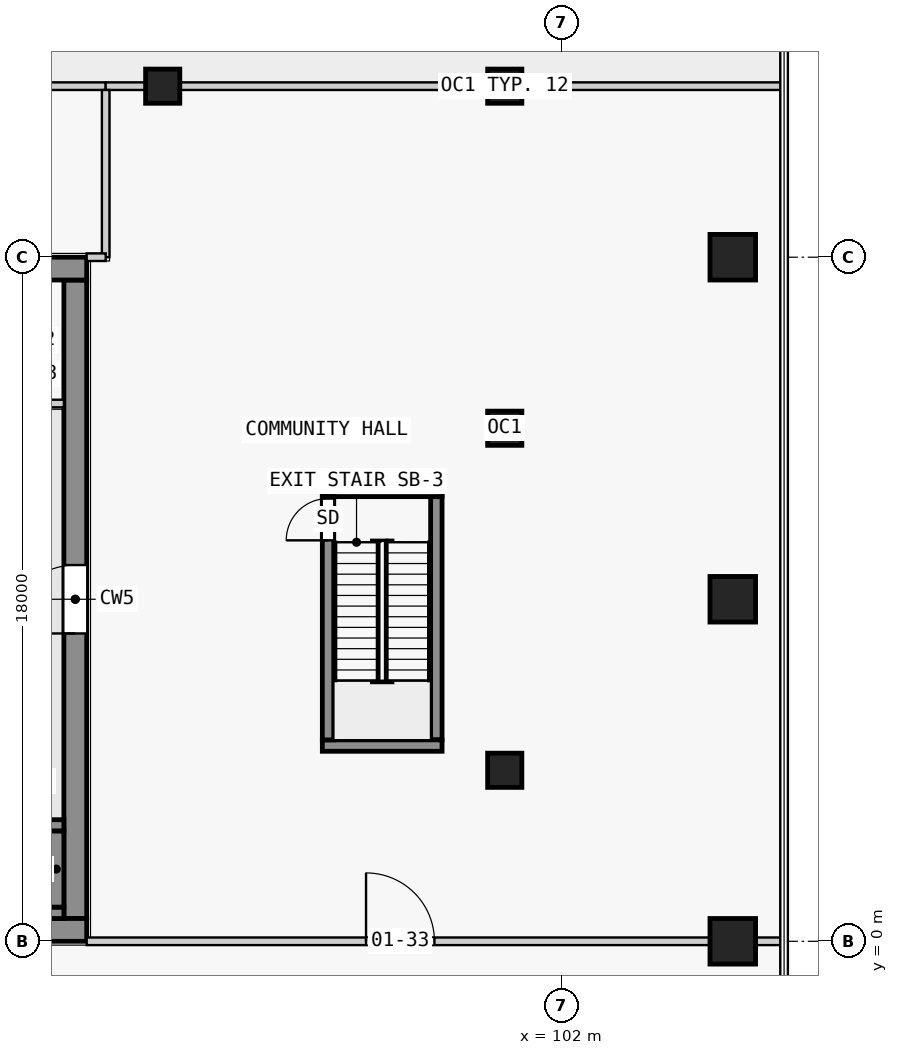
"""IFC4 building model, lengths in metres.
Left out: names, types, materials, properties, quantities, classifications, styles, units other than length and angle.
Written with IfcOpenShell. Run it as: python <this file> out.ifc"""

import sys

from ifc_helpers import new_model, si_unit, direction, frame, frame_2d, origin, origin_2d, place, context, subcontext, project, spatial, rectangle, extrude, element, fill, save


model = new_model("IFC4")
c1 = context("Model", 3, precision=1e-05, world=origin(), true_north=direction((0.0, 1.0)))
c2 = subcontext(c1, "Body", "Model", "MODEL_VIEW")
j1 = project(units=[si_unit("LENGTHUNIT", "METRE"), si_unit("PLANEANGLEUNIT", "RADIAN")], contexts=[c1])
p1 = place(None, origin())
s1 = spatial("IfcSite", under=j1, at=p1, CompositionType="ELEMENT")
p2 = place(p1, origin())
s2 = spatial("IfcBuilding", under=s1, at=p2, CompositionType="ELEMENT")
p3 = place(p2, frame((0.0, 0.0, 8.0)))
s3 = spatial("IfcBuildingStorey", under=s2, at=p3, CompositionType="ELEMENT", Elevation=8.0)
for number, where, z_axis, x_axis in (
    (1, (106.5, 0.0, 0.0), (0.0, 0.0, 1.0), (1.0, 0.0, 0.0)),
    (2, (106.5, 9.0, 0.0), (0.0, 0.0, 1.0), (1.0, 0.0, 0.0)),
    (3, (106.5, 18.0, 0.0), (0.0, 0.0, 1.0), (1.0, 0.0, 0.0)),
):
    element("IfcColumn", number, at=place(p3, frame(where, z_axis=z_axis, x_axis=x_axis)), inside=s3, PredefinedType="COLUMN", context=c2, shape_type="SweptSolid", body=[
        extrude(rectangle(XDim=1.2, YDim=1.2, at=origin_2d()), origin(), (0.0, 0.0, 1.0), 4.8),
    ])
for number, where, z_axis, x_axis in (
    (4, (100.5, 4.5, 0.0), (0.0, 0.0, 1.0), (1.0, 0.0, 0.0)),
    (5, (100.5, 13.5, 0.0), (0.0, 0.0, 1.0), (1.0, 0.0, 0.0)),
    (6, (100.5, 22.5, 0.0), (0.0, 0.0, 1.0), (1.0, 0.0, 0.0)),
    (7, (91.5, 22.5, 0.0), (0.0, 0.0, 1.0), (1.0, 0.0, 0.0)),
):
    element("IfcColumn", number, at=place(p3, frame(where, z_axis=z_axis, x_axis=x_axis)), inside=s3, PredefinedType="COLUMN", context=c2, shape_type="SweptSolid", body=[
        extrude(rectangle(XDim=0.9, YDim=0.9, at=origin_2d()), origin(), (0.0, 0.0, 1.0), 4.8),
    ])
for number, where, z_axis, x_axis in (
    (8, (75.0, 0.3, 0.0), (0.0, 0.0, 1.0), (1.0, 0.0, 0.0)),
    (9, (75.0, 17.7, 0.0), (0.0, 0.0, 1.0), (1.0, 0.0, 0.0)),
):
    element("IfcWall", number, at=place(p3, frame(where, z_axis=z_axis, x_axis=x_axis)), inside=s3, PredefinedType="SHEAR", context=c2, shape_type="SweptSolid", body=[
        extrude(rectangle(XDim=14.5, YDim=0.6, at=frame_2d((7.25, 0.0))), origin(), (0.0, 0.0, 1.0), 4.45),
    ])
p4 = place(p3, frame((89.2, 0.6, 0.0), z_axis=(0.0, 0.0, 1.0), x_axis=(0.0, 1.0, 0.0)))
e10 = element("IfcWall", 10, at=p4, inside=s3, PredefinedType="SHEAR", context=c2, shape_type="SweptSolid", body=[
    extrude(rectangle(XDim=16.8, YDim=0.6, at=frame_2d((8.4, 0.0))), origin(), (0.0, 0.0, 1.0), 4.45),
])
p5 = place(p4, frame((7.5, 0.0, 0.0)))
e11 = element("IfcOpeningElement", 11, at=p5, cuts=e10, PredefinedType="OPENING", context=c2, shape_type="SweptSolid", body=[
    extrude(rectangle(XDim=1.8, YDim=2.1, at=frame_2d((0.9, 1.05))), frame((0.0, 0.31, 0.0), z_axis=(0.0, -1.0, 0.0), x_axis=(1.0, 0.0, 0.0)), (0.0, 0.0, 1.0), 0.62),
])
p6 = place(p3, frame((81.3, 0.75, 0.0), z_axis=(0.0, 0.0, 1.0), x_axis=(1.0, 0.0, 0.0)))
e12 = element("IfcWall", 12, at=p6, inside=s3, PredefinedType="SHEAR", context=c2, shape_type="SweptSolid", body=[
    extrude(rectangle(XDim=7.6, YDim=0.3, at=frame_2d((3.8, 0.0))), origin(), (0.0, 0.0, 1.0), 4.45),
])
p7 = place(p3, frame((88.7, 0.9, 0.0), z_axis=(0.0, 0.0, 1.0), x_axis=(0.0, 1.0, 0.0)))
e13 = element("IfcWall", 13, at=p7, inside=s3, PredefinedType="SHEAR", context=c2, shape_type="SweptSolid", body=[
    extrude(rectangle(XDim=2.0, YDim=0.4, at=frame_2d((1.0, 0.0))), origin(), (0.0, 0.0, 1.0), 4.45),
])
p8 = place(p3, frame((81.3, 3.05, 0.0), z_axis=(0.0, 0.0, 1.0), x_axis=(1.0, 0.0, 0.0)))
e14 = element("IfcWall", 14, at=p8, inside=s3, PredefinedType="SHEAR", context=c2, shape_type="SweptSolid", body=[
    extrude(rectangle(XDim=7.6, YDim=0.3, at=frame_2d((3.8, 0.0))), origin(), (0.0, 0.0, 1.0), 4.45),
])
p9 = place(p8, frame((0.55, 0.0, 0.0)))
e15 = element("IfcOpeningElement", 15, at=p9, cuts=e14, PredefinedType="OPENING", context=c2, shape_type="SweptSolid", body=[
    extrude(rectangle(XDim=1.1, YDim=2.1, at=frame_2d((0.55, 1.05))), frame((0.0, 0.16, 0.0), z_axis=(0.0, -1.0, 0.0), x_axis=(1.0, 0.0, 0.0)), (0.0, 0.0, 1.0), 0.32),
])
p10 = place(p8, frame((3.05, 0.0, 0.0)))
e16 = element("IfcOpeningElement", 16, at=p10, cuts=e14, PredefinedType="OPENING", context=c2, shape_type="SweptSolid", body=[
    extrude(rectangle(XDim=1.1, YDim=2.1, at=frame_2d((0.55, 1.05))), frame((0.0, 0.16, 0.0), z_axis=(0.0, -1.0, 0.0), x_axis=(1.0, 0.0, 0.0)), (0.0, 0.0, 1.0), 0.32),
])
p11 = place(p8, frame((5.55, 0.0, 0.0)))
e17 = element("IfcOpeningElement", 17, at=p11, cuts=e14, PredefinedType="OPENING", context=c2, shape_type="SweptSolid", body=[
    extrude(rectangle(XDim=1.1, YDim=2.1, at=frame_2d((0.55, 1.05))), frame((0.0, 0.16, 0.0), z_axis=(0.0, -1.0, 0.0), x_axis=(1.0, 0.0, 0.0)), (0.0, 0.0, 1.0), 0.32),
])
p12 = place(p3, frame((95.85, 5.3, 0.0), z_axis=(0.0, 0.0, 1.0), x_axis=(0.0, 1.0, 0.0)))
e18 = element("IfcWall", 18, at=p12, inside=s3, PredefinedType="SHEAR", context=c2, shape_type="SweptSolid", body=[
    extrude(rectangle(XDim=6.4, YDim=0.3, at=frame_2d((3.2, 0.0))), origin(), (0.0, 0.0, 1.0), 4.45),
])
p13 = place(p12, frame((5.25, 0.0, 0.0)))
e19 = element("IfcOpeningElement", 19, at=p13, cuts=e18, PredefinedType="OPENING", context=c2, shape_type="SweptSolid", body=[
    extrude(rectangle(XDim=1.1, YDim=2.1, at=frame_2d((0.55, 1.05))), frame((0.0, 0.16, 0.0), z_axis=(0.0, -1.0, 0.0), x_axis=(1.0, 0.0, 0.0)), (0.0, 0.0, 1.0), 0.32),
])
p14 = place(p3, frame((98.7, 5.3, 0.0), z_axis=(0.0, 0.0, 1.0), x_axis=(0.0, 1.0, 0.0)))
e20 = element("IfcWall", 20, at=p14, inside=s3, PredefinedType="SHEAR", context=c2, shape_type="SweptSolid", body=[
    extrude(rectangle(XDim=6.4, YDim=0.3, at=frame_2d((3.2, 0.0))), origin(), (0.0, 0.0, 1.0), 4.45),
])
for number, where, z_axis, x_axis in (
    (21, (95.7, 5.15, 0.0), (0.0, 0.0, 1.0), (1.0, 0.0, 0.0)),
    (22, (95.7, 11.85, 0.0), (0.0, 0.0, 1.0), (1.0, 0.0, 0.0)),
):
    element("IfcWall", number, at=place(p3, frame(where, z_axis=z_axis, x_axis=x_axis)), inside=s3, PredefinedType="SHEAR", context=c2, shape_type="SweptSolid", body=[
        extrude(rectangle(XDim=3.15, YDim=0.3, at=frame_2d((1.575, 0.0))), origin(), (0.0, 0.0, 1.0), 4.45),
    ])
p15 = place(p3, frame((85.5, 14.15, 0.0), z_axis=(0.0, 0.0, 1.0), x_axis=(1.0, 0.0, 0.0)))
e23 = element("IfcWall", 23, at=p15, inside=s3, PredefinedType="PARTITIONING", context=c2, shape_type="SweptSolid", body=[
    extrude(rectangle(XDim=3.4, YDim=0.2, at=frame_2d((1.7, 0.0))), origin(), (0.0, 0.0, 1.0), 4.45),
])
p16 = place(p15, frame((0.4, 0.0, 0.0)))
e24 = element("IfcOpeningElement", 24, at=p16, cuts=e23, PredefinedType="OPENING", context=c2, shape_type="SweptSolid", body=[
    extrude(rectangle(XDim=0.9, YDim=2.1, at=frame_2d((0.45, 1.05))), frame((0.0, 0.11, 0.0), z_axis=(0.0, -1.0, 0.0), x_axis=(1.0, 0.0, 0.0)), (0.0, 0.0, 1.0), 0.22),
])
p17 = place(p15, frame((1.95, 0.0, 0.0)))
e25 = element("IfcOpeningElement", 25, at=p17, cuts=e23, PredefinedType="OPENING", context=c2, shape_type="SweptSolid", body=[
    extrude(rectangle(XDim=0.9, YDim=2.1, at=frame_2d((0.45, 1.05))), frame((0.0, 0.11, 0.0), z_axis=(0.0, -1.0, 0.0), x_axis=(1.0, 0.0, 0.0)), (0.0, 0.0, 1.0), 0.22),
])
p18 = place(p3, frame((89.5, 0.0, 0.0), z_axis=(0.0, 0.0, 1.0), x_axis=(1.0, 0.0, 0.0)))
e26 = element("IfcWall", 26, at=p18, inside=s3, PredefinedType="PARTITIONING", context=c2, shape_type="SweptSolid", body=[
    extrude(rectangle(XDim=16.4, YDim=0.2, at=frame_2d((8.2, 0.0))), origin(), (0.0, 0.0, 1.0), 4.45),
])
p19 = place(p18, frame((7.35, 0.0, 0.0)))
e27 = element("IfcOpeningElement", 27, at=p19, cuts=e26, PredefinedType="OPENING", context=c2, shape_type="SweptSolid", body=[
    extrude(rectangle(XDim=1.8, YDim=2.1, at=frame_2d((0.9, 1.05))), frame((0.0, 0.11, 0.0), z_axis=(0.0, -1.0, 0.0), x_axis=(1.0, 0.0, 0.0)), (0.0, 0.0, 1.0), 0.22),
])
p20 = place(p3, frame((107.1, 0.0, 0.0), z_axis=(0.0, 0.0, 1.0), x_axis=(1.0, 0.0, 0.0)))
e28 = element("IfcWall", 28, at=p20, inside=s3, PredefinedType="PARTITIONING", context=c2, shape_type="SweptSolid", body=[
    extrude(rectangle(XDim=0.75, YDim=0.2, at=frame_2d((0.375, 0.0))), origin(), (0.0, 0.0, 1.0), 4.45),
])
p21 = place(p3, frame((90.0, 22.5, 0.0), z_axis=(0.0, 0.0, 1.0), x_axis=(-1.0, 0.0, 0.0)))
e29 = element("IfcWall", 29, at=p21, inside=s3, PredefinedType="PARTITIONING", context=c2, shape_type="SweptSolid", body=[
    extrude(rectangle(XDim=7.05, YDim=0.2, at=frame_2d((3.525, 0.0))), origin(), (0.0, 0.0, 1.0), 4.45),
])
p22 = place(p21, frame((2.6, 0.0, 0.0)))
e30 = element("IfcOpeningElement", 30, at=p22, cuts=e29, PredefinedType="OPENING", context=c2, shape_type="SweptSolid", body=[
    extrude(rectangle(XDim=1.8, YDim=2.1, at=frame_2d((0.9, 1.05))), frame((0.0, 0.11, 0.0), z_axis=(0.0, -1.0, 0.0), x_axis=(1.0, 0.0, 0.0)), (0.0, 0.0, 1.0), 0.22),
])
p23 = place(p3, frame((107.85, 22.5, 0.0), z_axis=(0.0, 0.0, 1.0), x_axis=(-1.0, 0.0, 0.0)))
e31 = element("IfcWall", 31, at=p23, inside=s3, PredefinedType="PARTITIONING", context=c2, shape_type="SweptSolid", body=[
    extrude(rectangle(XDim=6.9, YDim=0.2, at=frame_2d((3.45, 0.0))), origin(), (0.0, 0.0, 1.0), 3.75),
])
p24 = place(p3, frame((100.05, 22.5, 0.0), z_axis=(0.0, 0.0, 1.0), x_axis=(-1.0, 0.0, 0.0)))
e32 = element("IfcWall", 32, at=p24, inside=s3, PredefinedType="PARTITIONING", context=c2, shape_type="SweptSolid", body=[
    extrude(rectangle(XDim=8.1, YDim=0.2, at=frame_2d((4.05, 0.0))), origin(), (0.0, 0.0, 1.0), 4.45),
])
p25 = place(p3, frame((91.05, 22.5, 0.0), z_axis=(0.0, 0.0, 1.0), x_axis=(-1.0, 0.0, 0.0)))
e33 = element("IfcWall", 33, at=p25, inside=s3, PredefinedType="PARTITIONING", context=c2, shape_type="SweptSolid", body=[
    extrude(rectangle(XDim=1.05, YDim=0.2, at=frame_2d((0.525, 0.0))), origin(), (0.0, 0.0, 1.0), 4.45),
])
p26 = place(p3, frame((90.0, 22.4, 0.0), z_axis=(0.0, 0.0, 1.0), x_axis=(0.0, -1.0, 0.0)))
e34 = element("IfcWall", 34, at=p26, inside=s3, PredefinedType="PARTITIONING", context=c2, shape_type="SweptSolid", body=[
    extrude(rectangle(XDim=4.4, YDim=0.2, at=frame_2d((2.2, 0.0))), origin(), (0.0, 0.0, 1.0), 4.45),
])
p27 = place(p3, frame((90.0, 18.0, 0.0), z_axis=(0.0, 0.0, 1.0), x_axis=(-1.0, 0.0, 0.0)))
e35 = element("IfcWall", 35, at=p27, inside=s3, PredefinedType="PARTITIONING", context=c2, shape_type="SweptSolid", body=[
    extrude(rectangle(XDim=0.5, YDim=0.2, at=frame_2d((0.25, 0.0))), origin(), (0.0, 0.0, 1.0), 4.45),
])
p28 = place(p13, origin())
e36 = element("IfcDoor", 36, at=p28, inside=s3, OperationType="SINGLE_SWING_LEFT", PredefinedType="DOOR", context=c2, shape_type="SweptSolid", body=[
    extrude(rectangle(XDim=1.1, YDim=2.1, at=frame_2d((0.55, 1.05))), frame((0.0, 0.025, 0.0), z_axis=(0.0, -1.0, 0.0), x_axis=(1.0, 0.0, 0.0)), (0.0, 0.0, 1.0), 0.05),
])
fill(e19, e36)
p29 = place(p5, origin())
e37 = element("IfcDoor", 37, at=p29, inside=s3, OperationType="DOUBLE_DOOR_SINGLE_SWING", PredefinedType="DOOR", context=c2, shape_type="SweptSolid", body=[
    extrude(rectangle(XDim=1.8, YDim=2.1, at=frame_2d((0.9, 1.05))), frame((0.0, 0.025, 0.0), z_axis=(0.0, -1.0, 0.0), x_axis=(1.0, 0.0, 0.0)), (0.0, 0.0, 1.0), 0.05),
])
fill(e11, e37)
p30 = place(p19, origin())
e38 = element("IfcDoor", 38, at=p30, inside=s3, OperationType="DOUBLE_DOOR_SINGLE_SWING", PredefinedType="DOOR", context=c2, shape_type="SweptSolid", body=[
    extrude(rectangle(XDim=1.8, YDim=2.1, at=frame_2d((0.9, 1.05))), frame((0.0, 0.025, 0.0), z_axis=(0.0, -1.0, 0.0), x_axis=(1.0, 0.0, 0.0)), (0.0, 0.0, 1.0), 0.05),
])
fill(e27, e38)
save(model, sys.argv[1])
